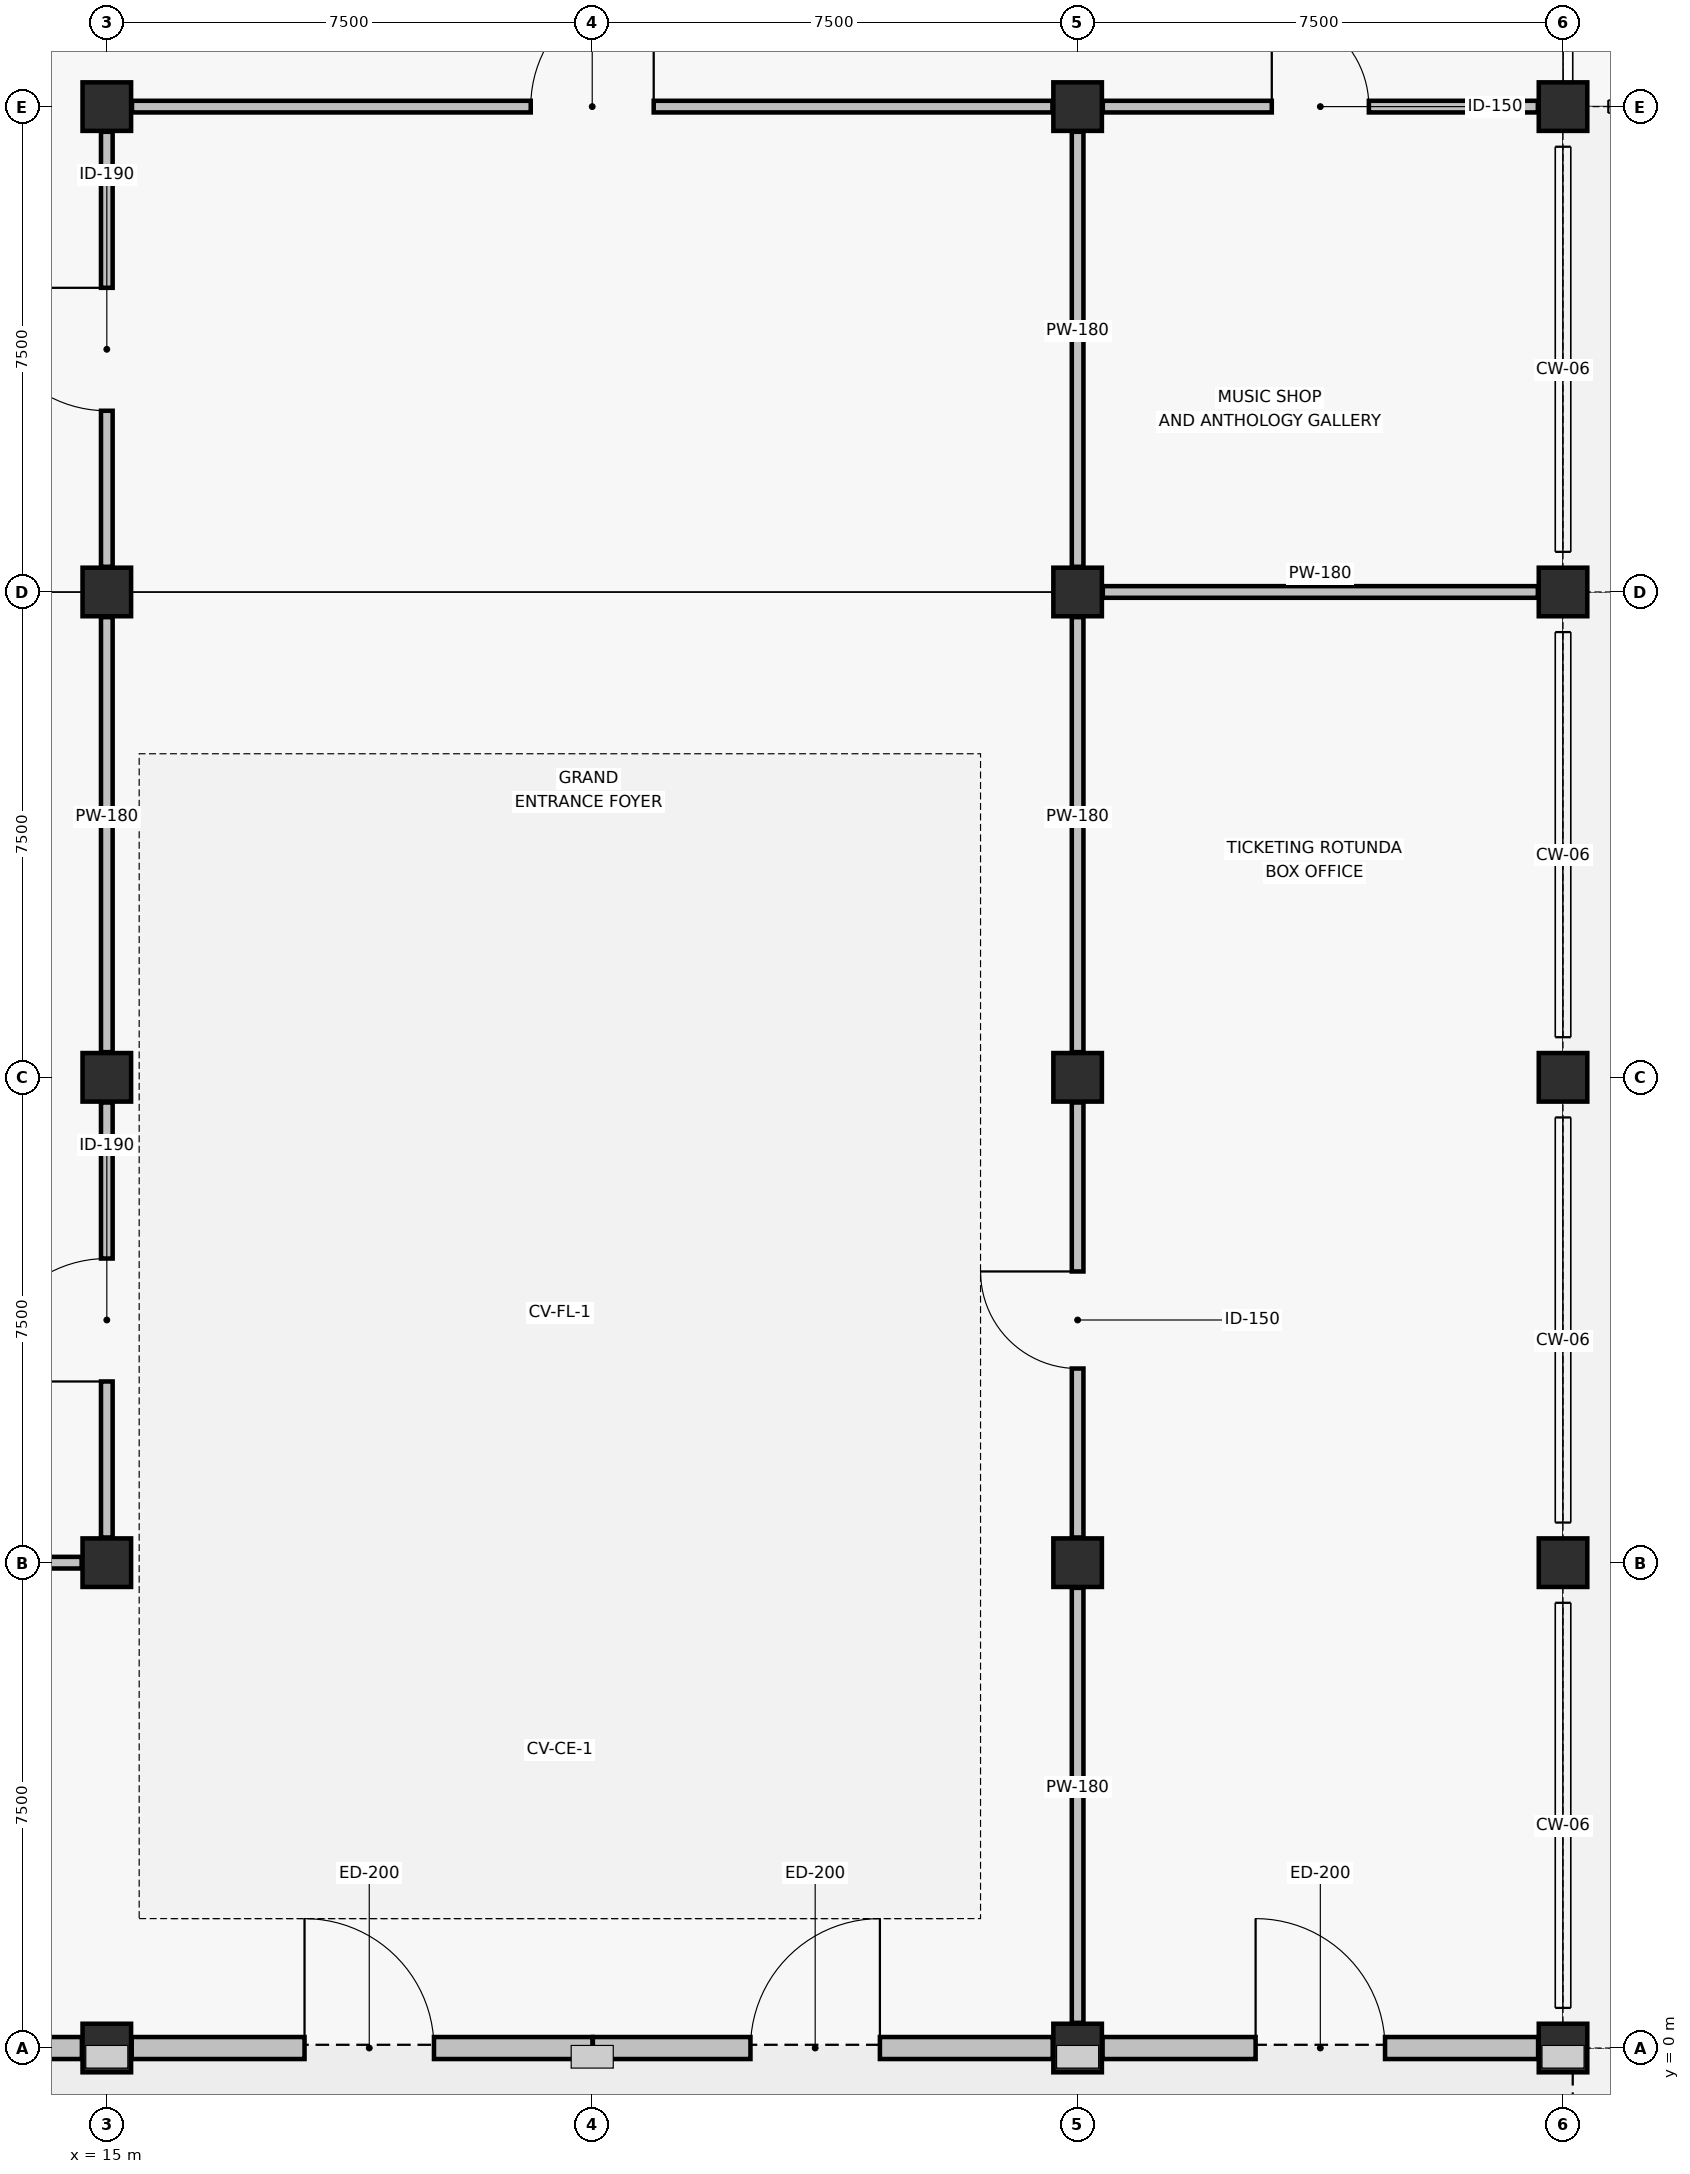
"""IFC4 building model, lengths in metres.
Left out: names, types, materials, properties, quantities, classifications, styles, units other than length and angle.
Written with IfcOpenShell. Run it as: python <this file> out.ifc"""

import sys

from ifc_helpers import new_model, si_unit, direction, frame, frame_2d, origin, origin_2d, place, context, subcontext, project, spatial, rectangle, extrude, element, fill, save


model = new_model("IFC4")
c1 = context("Model", 3, precision=1e-05, world=origin(), true_north=direction((0.0, 1.0)))
c2 = subcontext(c1, "Body", "Model", "MODEL_VIEW")
j1 = project(units=[si_unit("LENGTHUNIT", "METRE"), si_unit("PLANEANGLEUNIT", "RADIAN")], contexts=[c1])
p1 = place(None, origin())
s1 = spatial("IfcSite", under=j1, at=p1, CompositionType="ELEMENT")
p2 = place(p1, origin())
s2 = spatial("IfcBuilding", under=s1, at=p2, CompositionType="ELEMENT")
p3 = place(p2, origin())
s3 = spatial("IfcBuildingStorey", under=s2, at=p3, CompositionType="ELEMENT", Elevation=0.0)
for number, where, z_axis, x_axis in (
    (1, (15.0, 0.0, 0.0), (0.0, 0.0, 1.0), (1.0, 0.0, 0.0)),
    (2, (15.0, 7.5, 0.0), (0.0, 0.0, 1.0), (1.0, 0.0, 0.0)),
    (3, (15.0, 15.0, 0.0), (0.0, 0.0, 1.0), (1.0, 0.0, 0.0)),
    (4, (15.0, 22.5, 0.0), (0.0, 0.0, 1.0), (1.0, 0.0, 0.0)),
    (5, (15.0, 30.0, 0.0), (0.0, 0.0, 1.0), (1.0, 0.0, 0.0)),
    (6, (30.0, 0.0, 0.0), (0.0, 0.0, 1.0), (1.0, 0.0, 0.0)),
    (7, (30.0, 7.5, 0.0), (0.0, 0.0, 1.0), (1.0, 0.0, 0.0)),
    (8, (30.0, 15.0, 0.0), (0.0, 0.0, 1.0), (1.0, 0.0, 0.0)),
    (9, (30.0, 22.5, 0.0), (0.0, 0.0, 1.0), (1.0, 0.0, 0.0)),
    (10, (30.0, 30.0, 0.0), (0.0, 0.0, 1.0), (1.0, 0.0, 0.0)),
    (11, (37.5, 0.0, 0.0), (0.0, 0.0, 1.0), (1.0, 0.0, 0.0)),
    (12, (37.5, 7.5, 0.0), (0.0, 0.0, 1.0), (1.0, 0.0, 0.0)),
    (13, (37.5, 15.0, 0.0), (0.0, 0.0, 1.0), (1.0, 0.0, 0.0)),
    (14, (37.5, 22.5, 0.0), (0.0, 0.0, 1.0), (1.0, 0.0, 0.0)),
    (15, (37.5, 30.0, 0.0), (0.0, 0.0, 1.0), (1.0, 0.0, 0.0)),
):
    element("IfcColumn", number, at=place(p3, frame(where, z_axis=z_axis, x_axis=x_axis)), inside=s3, PredefinedType="COLUMN", context=c2, shape_type="SweptSolid", body=[
        extrude(rectangle(XDim=0.75, YDim=0.75, at=origin_2d()), origin(), (0.0, 0.0, 1.0), 4.8),
    ])
p4 = place(p3, frame((7.505, 0.0, 0.0), z_axis=(0.0, 0.0, 1.0), x_axis=(1.0, 0.0, 0.0)))
e16 = element("IfcWall", 16, at=p4, inside=s3, PredefinedType="SOLIDWALL", context=c2, shape_type="SweptSolid", body=[
    extrude(rectangle(XDim=7.11, YDim=0.34, at=frame_2d((3.555, 0.0))), origin(), (0.0, 0.0, 1.0), 2.97),
])
p5 = place(p4, frame((2.44, 0.0, 0.0)))
e17 = element("IfcOpeningElement", 17, at=p5, cuts=e16, PredefinedType="OPENING", context=c2, shape_type="SweptSolid", body=[
    extrude(rectangle(XDim=2.0, YDim=2.2, at=frame_2d((1.0, 1.1))), frame((0.0, 0.18, 0.0), z_axis=(0.0, -1.0, 0.0), x_axis=(1.0, 0.0, 0.0)), (0.0, 0.0, 1.0), 0.36),
])
p6 = place(p3, frame((15.385, 0.0, 0.0), z_axis=(0.0, 0.0, 1.0), x_axis=(1.0, 0.0, 0.0)))
e18 = element("IfcWall", 18, at=p6, inside=s3, PredefinedType="SOLIDWALL", context=c2, shape_type="SweptSolid", body=[
    extrude(rectangle(XDim=7.12, YDim=0.34, at=frame_2d((3.56, 0.0))), origin(), (0.0, 0.0, 1.0), 2.97),
])
p7 = place(p6, frame((2.67, 0.0, 0.0)))
e19 = element("IfcOpeningElement", 19, at=p7, cuts=e18, PredefinedType="OPENING", context=c2, shape_type="SweptSolid", body=[
    extrude(rectangle(XDim=2.0, YDim=2.2, at=frame_2d((1.0, 1.1))), frame((0.0, 0.18, 0.0), z_axis=(0.0, -1.0, 0.0), x_axis=(1.0, 0.0, 0.0)), (0.0, 0.0, 1.0), 0.36),
])
p8 = place(p3, frame((22.51, 0.0, 0.0), z_axis=(0.0, 0.0, 1.0), x_axis=(1.0, 0.0, 0.0)))
e20 = element("IfcWall", 20, at=p8, inside=s3, PredefinedType="SOLIDWALL", context=c2, shape_type="SweptSolid", body=[
    extrude(rectangle(XDim=7.105, YDim=0.34, at=frame_2d((3.552, 0.0))), origin(), (0.0, 0.0, 1.0), 2.97),
])
p9 = place(p8, frame((2.435, 0.0, 0.0)))
e21 = element("IfcOpeningElement", 21, at=p9, cuts=e20, PredefinedType="OPENING", context=c2, shape_type="SweptSolid", body=[
    extrude(rectangle(XDim=2.0, YDim=2.2, at=frame_2d((1.0, 1.1))), frame((0.0, 0.18, 0.0), z_axis=(0.0, -1.0, 0.0), x_axis=(1.0, 0.0, 0.0)), (0.0, 0.0, 1.0), 0.36),
])
p10 = place(p3, frame((30.385, 0.0, 0.0), z_axis=(0.0, 0.0, 1.0), x_axis=(1.0, 0.0, 0.0)))
e22 = element("IfcWall", 22, at=p10, inside=s3, PredefinedType="SOLIDWALL", context=c2, shape_type="SweptSolid", body=[
    extrude(rectangle(XDim=6.73, YDim=0.34, at=frame_2d((3.365, 0.0))), origin(), (0.0, 0.0, 1.0), 2.97),
])
p11 = place(p10, frame((2.365, 0.0, 0.0)))
e23 = element("IfcOpeningElement", 23, at=p11, cuts=e22, PredefinedType="OPENING", context=c2, shape_type="SweptSolid", body=[
    extrude(rectangle(XDim=2.0, YDim=2.2, at=frame_2d((1.0, 1.1))), frame((0.0, 0.18, 0.0), z_axis=(0.0, -1.0, 0.0), x_axis=(1.0, 0.0, 0.0)), (0.0, 0.0, 1.0), 0.36),
])
p12 = place(p3, frame((0.389, 7.5, 0.0), z_axis=(0.0, 0.0, 1.0), x_axis=(1.0, 0.0, 0.0)))
e24 = element("IfcWall", 24, at=p12, inside=s3, PredefinedType="PARTITIONING", context=c2, shape_type="SweptSolid", body=[
    extrude(rectangle(XDim=14.222, YDim=0.18, at=frame_2d((7.111, 0.0))), origin(), (0.0, 0.0, 1.0), 2.97),
])
p13 = place(p12, frame((10.961, 0.0, 0.0)))
e25 = element("IfcOpeningElement", 25, at=p13, cuts=e24, PredefinedType="OPENING", context=c2, shape_type="SweptSolid", body=[
    extrude(rectangle(XDim=1.9, YDim=2.18, at=frame_2d((0.95, 1.09))), frame((0.0, 0.1, 0.0), z_axis=(0.0, -1.0, 0.0), x_axis=(1.0, 0.0, 0.0)), (0.0, 0.0, 1.0), 0.2),
])
p14 = place(p3, frame((15.389, 30.0, 0.0), z_axis=(0.0, 0.0, 1.0), x_axis=(1.0, 0.0, 0.0)))
e26 = element("IfcWall", 26, at=p14, inside=s3, PredefinedType="PARTITIONING", context=c2, shape_type="SweptSolid", body=[
    extrude(rectangle(XDim=14.222, YDim=0.18, at=frame_2d((7.111, 0.0))), origin(), (0.0, 0.0, 1.0), 2.97),
])
p15 = place(p14, frame((6.161, 0.0, 0.0)))
e27 = element("IfcOpeningElement", 27, at=p15, cuts=e26, PredefinedType="OPENING", context=c2, shape_type="SweptSolid", body=[
    extrude(rectangle(XDim=1.9, YDim=2.18, at=frame_2d((0.95, 1.09))), frame((0.0, 0.1, 0.0), z_axis=(0.0, -1.0, 0.0), x_axis=(1.0, 0.0, 0.0)), (0.0, 0.0, 1.0), 0.2),
])
p16 = place(p3, frame((30.389, 30.0, 0.0), z_axis=(0.0, 0.0, 1.0), x_axis=(1.0, 0.0, 0.0)))
e28 = element("IfcWall", 28, at=p16, inside=s3, PredefinedType="PARTITIONING", context=c2, shape_type="SweptSolid", body=[
    extrude(rectangle(XDim=6.722, YDim=0.18, at=frame_2d((3.361, 0.0))), origin(), (0.0, 0.0, 1.0), 2.97),
])
p17 = place(p16, frame((2.611, 0.0, 0.0)))
e29 = element("IfcOpeningElement", 29, at=p17, cuts=e28, PredefinedType="OPENING", context=c2, shape_type="SweptSolid", body=[
    extrude(rectangle(XDim=1.5, YDim=2.16, at=frame_2d((0.75, 1.08))), frame((0.0, 0.1, 0.0), z_axis=(0.0, -1.0, 0.0), x_axis=(1.0, 0.0, 0.0)), (0.0, 0.0, 1.0), 0.2),
])
for number, where, z_axis, x_axis in (
    (30, (30.389, 22.5, 0.0), (0.0, 0.0, 1.0), (1.0, 0.0, 0.0)),
    (31, (30.0, 0.389, 0.0), (0.0, 0.0, 1.0), (0.0, 1.0, 0.0)),
):
    element("IfcWall", number, at=place(p3, frame(where, z_axis=z_axis, x_axis=x_axis)), inside=s3, PredefinedType="PARTITIONING", context=c2, shape_type="SweptSolid", body=[
        extrude(rectangle(XDim=6.722, YDim=0.18, at=frame_2d((3.361, 0.0))), origin(), (0.0, 0.0, 1.0), 2.97),
    ])
p18 = place(p3, frame((30.0, 7.889, 0.0), z_axis=(0.0, 0.0, 1.0), x_axis=(0.0, 1.0, 0.0)))
e32 = element("IfcWall", 32, at=p18, inside=s3, PredefinedType="PARTITIONING", context=c2, shape_type="SweptSolid", body=[
    extrude(rectangle(XDim=6.722, YDim=0.18, at=frame_2d((3.361, 0.0))), origin(), (0.0, 0.0, 1.0), 2.97),
])
p19 = place(p18, frame((2.611, 0.0, 0.0)))
e33 = element("IfcOpeningElement", 33, at=p19, cuts=e32, PredefinedType="OPENING", context=c2, shape_type="SweptSolid", body=[
    extrude(rectangle(XDim=1.5, YDim=2.16, at=frame_2d((0.75, 1.08))), frame((0.0, 0.1, 0.0), z_axis=(0.0, -1.0, 0.0), x_axis=(1.0, 0.0, 0.0)), (0.0, 0.0, 1.0), 0.2),
])
for number, where, z_axis, x_axis in (
    (34, (30.0, 15.389, 0.0), (0.0, 0.0, 1.0), (0.0, 1.0, 0.0)),
    (35, (30.0, 22.889, 0.0), (0.0, 0.0, 1.0), (0.0, 1.0, 0.0)),
):
    element("IfcWall", number, at=place(p3, frame(where, z_axis=z_axis, x_axis=x_axis)), inside=s3, PredefinedType="PARTITIONING", context=c2, shape_type="SweptSolid", body=[
        extrude(rectangle(XDim=6.722, YDim=0.18, at=frame_2d((3.361, 0.0))), origin(), (0.0, 0.0, 1.0), 2.97),
    ])
p20 = place(p3, frame((15.0, 7.889, 0.0), z_axis=(0.0, 0.0, 1.0), x_axis=(0.0, 1.0, 0.0)))
e36 = element("IfcWall", 36, at=p20, inside=s3, PredefinedType="PARTITIONING", context=c2, shape_type="SweptSolid", body=[
    extrude(rectangle(XDim=6.722, YDim=0.18, at=frame_2d((3.361, 0.0))), origin(), (0.0, 0.0, 1.0), 2.97),
])
p21 = place(p20, frame((2.411, 0.0, 0.0)))
e37 = element("IfcOpeningElement", 37, at=p21, cuts=e36, PredefinedType="OPENING", context=c2, shape_type="SweptSolid", body=[
    extrude(rectangle(XDim=1.9, YDim=2.18, at=frame_2d((0.95, 1.09))), frame((0.0, 0.1, 0.0), z_axis=(0.0, -1.0, 0.0), x_axis=(1.0, 0.0, 0.0)), (0.0, 0.0, 1.0), 0.2),
])
p22 = place(p3, frame((15.0, 15.389, 0.0), z_axis=(0.0, 0.0, 1.0), x_axis=(0.0, 1.0, 0.0)))
e38 = element("IfcWall", 38, at=p22, inside=s3, PredefinedType="PARTITIONING", context=c2, shape_type="SweptSolid", body=[
    extrude(rectangle(XDim=6.722, YDim=0.18, at=frame_2d((3.361, 0.0))), origin(), (0.0, 0.0, 1.0), 2.97),
])
p23 = place(p3, frame((15.0, 22.889, 0.0), z_axis=(0.0, 0.0, 1.0), x_axis=(0.0, 1.0, 0.0)))
e39 = element("IfcWall", 39, at=p23, inside=s3, PredefinedType="PARTITIONING", context=c2, shape_type="SweptSolid", body=[
    extrude(rectangle(XDim=6.722, YDim=0.18, at=frame_2d((3.361, 0.0))), origin(), (0.0, 0.0, 1.0), 2.97),
])
p24 = place(p23, frame((2.411, 0.0, 0.0)))
e40 = element("IfcOpeningElement", 40, at=p24, cuts=e39, PredefinedType="OPENING", context=c2, shape_type="SweptSolid", body=[
    extrude(rectangle(XDim=1.9, YDim=2.18, at=frame_2d((0.95, 1.09))), frame((0.0, 0.1, 0.0), z_axis=(0.0, -1.0, 0.0), x_axis=(1.0, 0.0, 0.0)), (0.0, 0.0, 1.0), 0.2),
])
p25 = place(p7, frame((2.0, 0.0, 0.0), z_axis=(0.0, 0.0, 1.0), x_axis=(-1.0, 0.0, 0.0)))
e41 = element("IfcDoor", 41, at=p25, inside=s3, OperationType="SINGLE_SWING_RIGHT", PredefinedType="DOOR", context=c2, shape_type="SweptSolid", body=[
    extrude(rectangle(XDim=2.0, YDim=2.2, at=frame_2d((1.0, 1.1))), frame((0.0, 0.025, 0.0), z_axis=(0.0, -1.0, 0.0), x_axis=(1.0, 0.0, 0.0)), (0.0, 0.0, 1.0), 0.05),
])
fill(e19, e41)
p26 = place(p9, frame((2.0, 0.0, 0.0), z_axis=(0.0, 0.0, 1.0), x_axis=(-1.0, 0.0, 0.0)))
e42 = element("IfcDoor", 42, at=p26, inside=s3, OperationType="SINGLE_SWING_LEFT", PredefinedType="DOOR", context=c2, shape_type="SweptSolid", body=[
    extrude(rectangle(XDim=2.0, YDim=2.2, at=frame_2d((1.0, 1.1))), frame((0.0, 0.025, 0.0), z_axis=(0.0, -1.0, 0.0), x_axis=(1.0, 0.0, 0.0)), (0.0, 0.0, 1.0), 0.05),
])
fill(e21, e42)
p27 = place(p11, frame((2.0, 0.0, 0.0), z_axis=(0.0, 0.0, 1.0), x_axis=(-1.0, 0.0, 0.0)))
e43 = element("IfcDoor", 43, at=p27, inside=s3, OperationType="SINGLE_SWING_RIGHT", PredefinedType="DOOR", context=c2, shape_type="SweptSolid", body=[
    extrude(rectangle(XDim=2.0, YDim=2.2, at=frame_2d((1.0, 1.1))), frame((0.0, 0.025, 0.0), z_axis=(0.0, -1.0, 0.0), x_axis=(1.0, 0.0, 0.0)), (0.0, 0.0, 1.0), 0.05),
])
fill(e23, e43)
p28 = place(p15, origin())
e44 = element("IfcDoor", 44, at=p28, inside=s3, OperationType="SINGLE_SWING_RIGHT", PredefinedType="DOOR", context=c2, shape_type="SweptSolid", body=[
    extrude(rectangle(XDim=1.9, YDim=2.18, at=frame_2d((0.95, 1.09))), frame((0.0, 0.025, 0.0), z_axis=(0.0, -1.0, 0.0), x_axis=(1.0, 0.0, 0.0)), (0.0, 0.0, 1.0), 0.05),
])
fill(e27, e44)
p29 = place(p17, origin())
e45 = element("IfcDoor", 45, at=p29, inside=s3, OperationType="SINGLE_SWING_LEFT", PredefinedType="DOOR", context=c2, shape_type="SweptSolid", body=[
    extrude(rectangle(XDim=1.5, YDim=2.16, at=frame_2d((0.75, 1.08))), frame((0.0, 0.025, 0.0), z_axis=(0.0, -1.0, 0.0), x_axis=(1.0, 0.0, 0.0)), (0.0, 0.0, 1.0), 0.05),
])
fill(e29, e45)
p30 = place(p19, origin())
e46 = element("IfcDoor", 46, at=p30, inside=s3, OperationType="SINGLE_SWING_RIGHT", PredefinedType="DOOR", context=c2, shape_type="SweptSolid", body=[
    extrude(rectangle(XDim=1.5, YDim=2.16, at=frame_2d((0.75, 1.08))), frame((0.0, 0.025, 0.0), z_axis=(0.0, -1.0, 0.0), x_axis=(1.0, 0.0, 0.0)), (0.0, 0.0, 1.0), 0.05),
])
fill(e33, e46)
p31 = place(p21, origin())
e47 = element("IfcDoor", 47, at=p31, inside=s3, OperationType="SINGLE_SWING_LEFT", PredefinedType="DOOR", context=c2, shape_type="SweptSolid", body=[
    extrude(rectangle(XDim=1.9, YDim=2.18, at=frame_2d((0.95, 1.09))), frame((0.0, 0.025, 0.0), z_axis=(0.0, -1.0, 0.0), x_axis=(1.0, 0.0, 0.0)), (0.0, 0.0, 1.0), 0.05),
])
fill(e37, e47)
p32 = place(p24, origin())
e48 = element("IfcDoor", 48, at=p32, inside=s3, OperationType="SINGLE_SWING_RIGHT", PredefinedType="DOOR", context=c2, shape_type="SweptSolid", body=[
    extrude(rectangle(XDim=1.9, YDim=2.18, at=frame_2d((0.95, 1.09))), frame((0.0, 0.025, 0.0), z_axis=(0.0, -1.0, 0.0), x_axis=(1.0, 0.0, 0.0)), (0.0, 0.0, 1.0), 0.05),
])
fill(e40, e48)
save(model, sys.argv[1])
